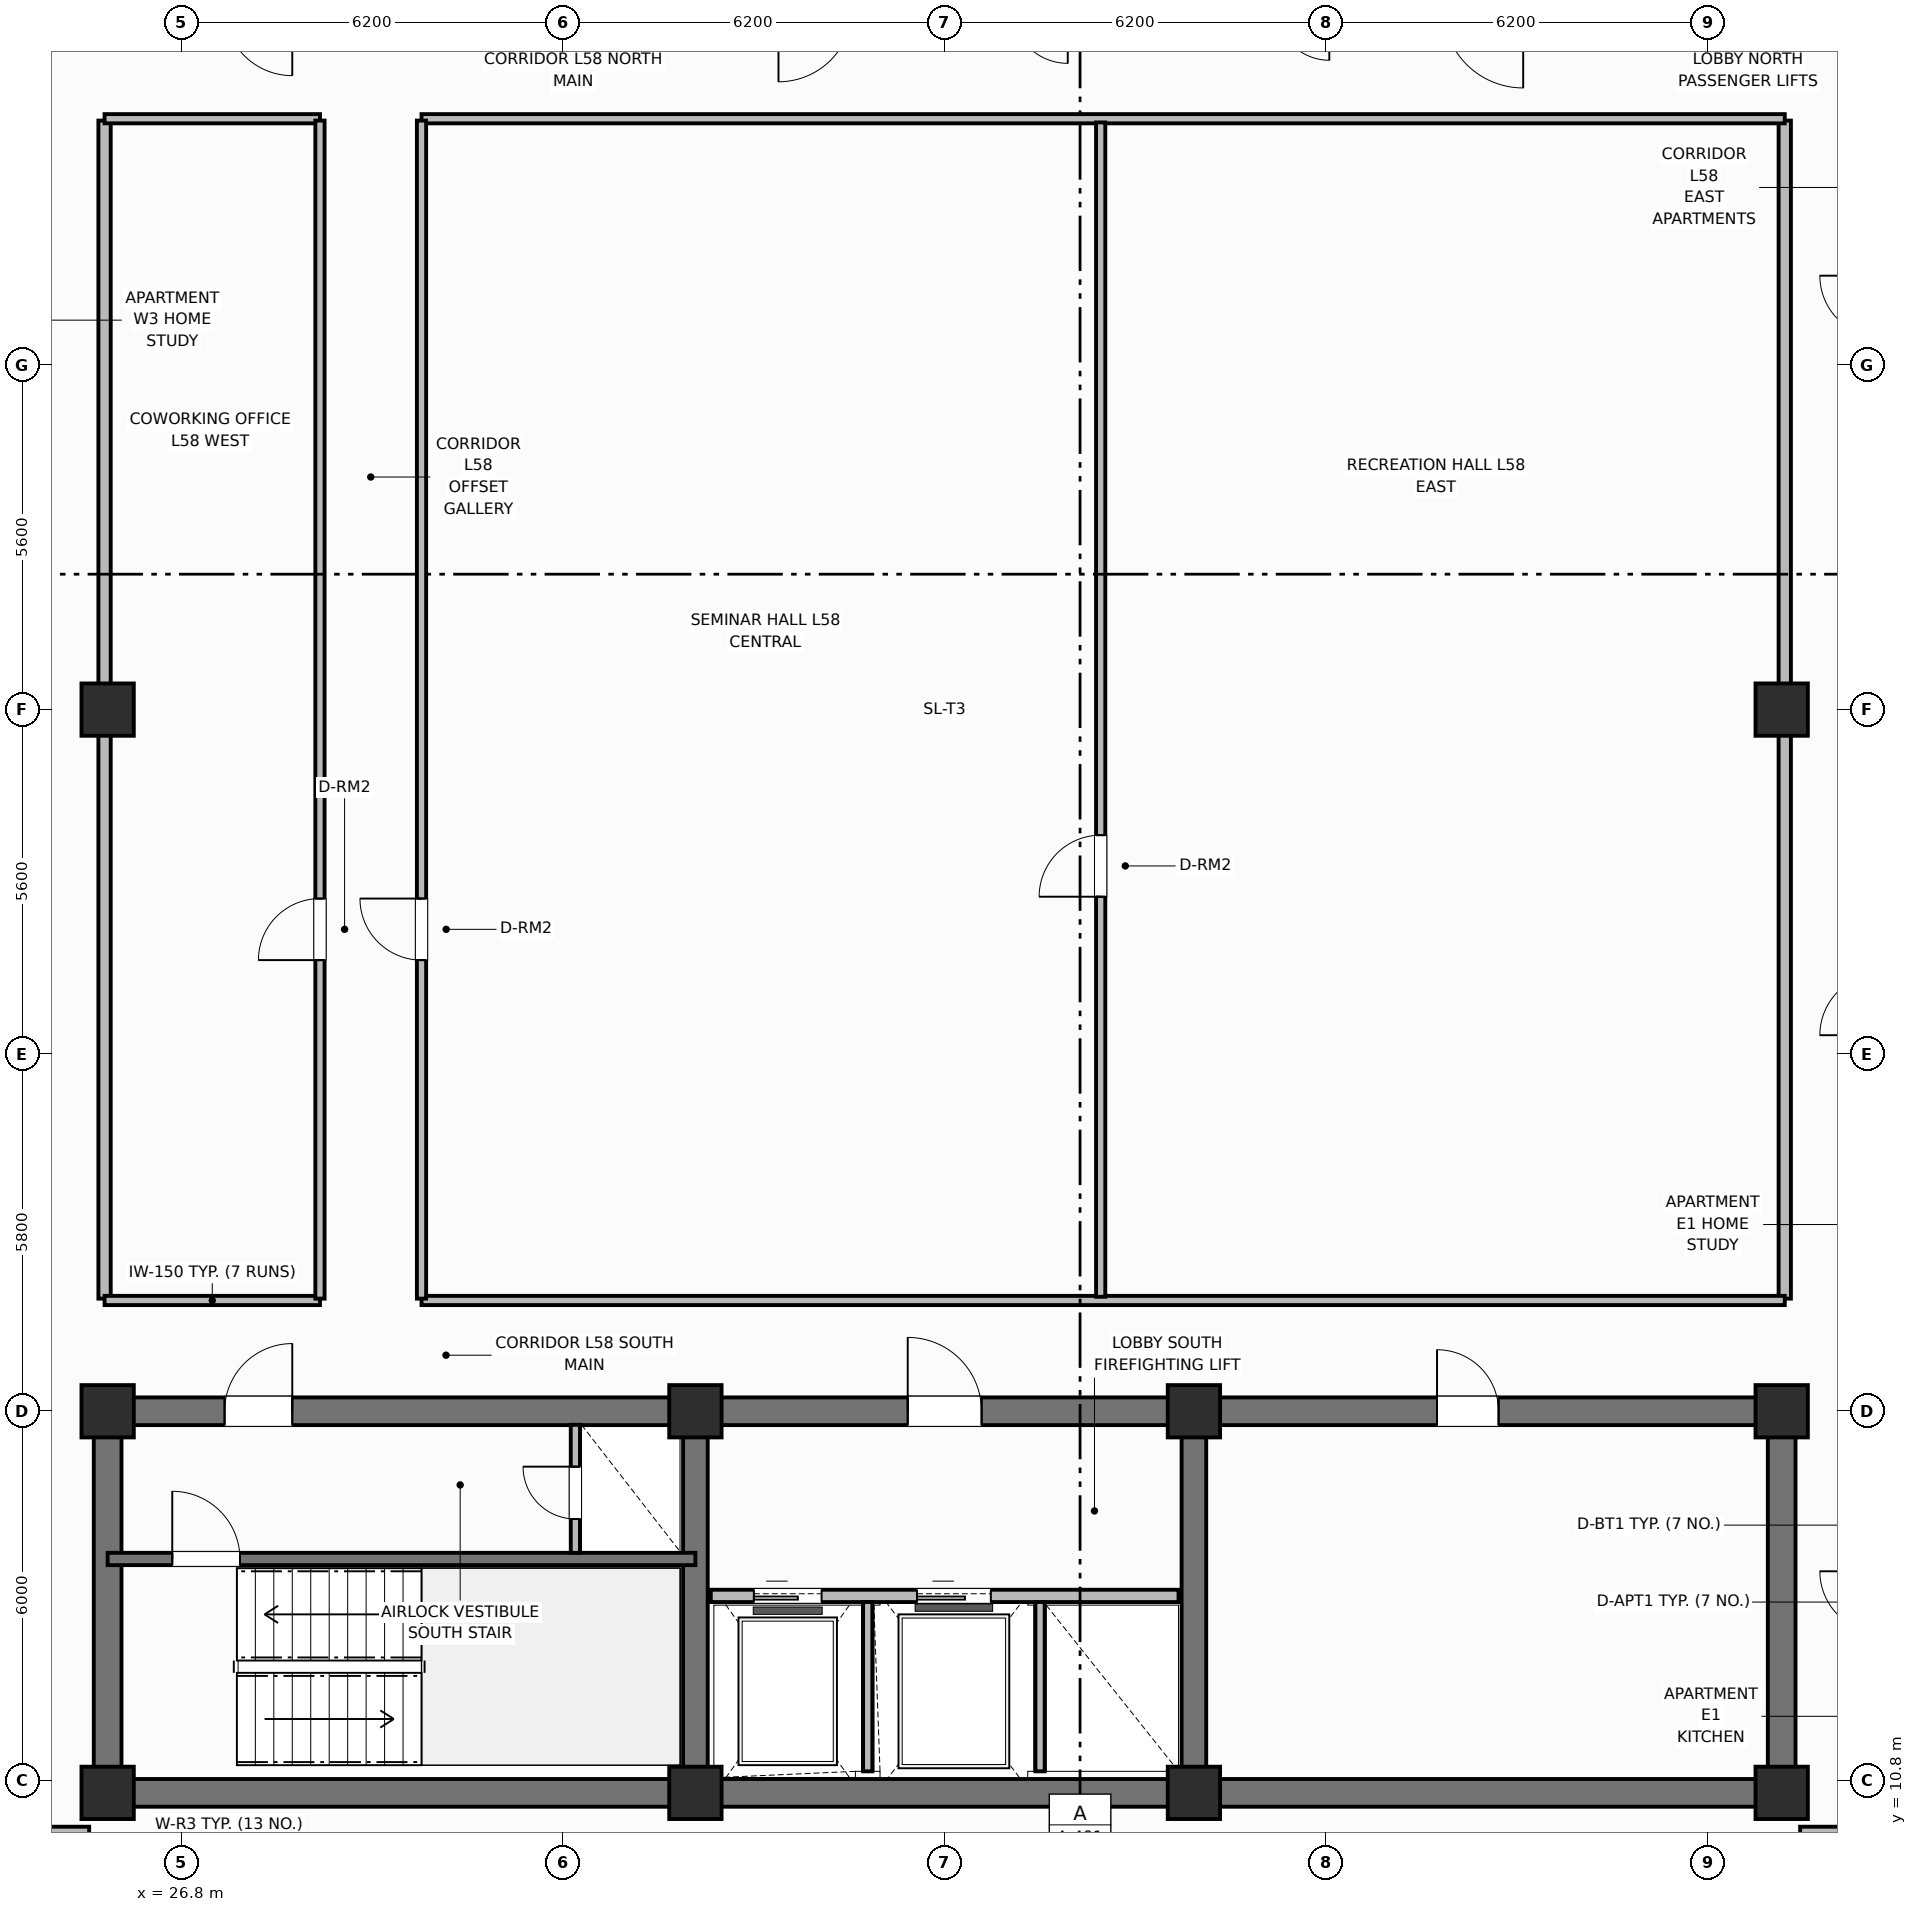
"""IFC4 building model, lengths in metres.
Left out: names, types, materials, properties, quantities, classifications, styles, units other than length and angle.
Written with IfcOpenShell. Run it as: python <this file> out.ifc"""

import sys

from ifc_helpers import new_model, si_unit, direction, frame, frame_2d, origin, origin_2d, place, context, subcontext, project, spatial, rectangle, extrude, element, fill, save


model = new_model("IFC4")
c1 = context("Model", 3, precision=1e-05, world=origin(), true_north=direction((0.0, 1.0)))
c2 = subcontext(c1, "Body", "Model", "MODEL_VIEW")
j1 = project(units=[si_unit("LENGTHUNIT", "METRE"), si_unit("PLANEANGLEUNIT", "RADIAN")], contexts=[c1])
p1 = place(None, origin())
s1 = spatial("IfcSite", under=j1, at=p1, CompositionType="ELEMENT")
p2 = place(p1, origin())
s2 = spatial("IfcBuilding", under=s1, at=p2, CompositionType="ELEMENT")
p3 = place(p2, frame((0.0, 0.0, 233.2)))
s3 = spatial("IfcBuildingStorey", under=s2, at=p3, CompositionType="ELEMENT", Elevation=233.2)
p4 = place(p3, frame((52.8, 10.6, 0.0), z_axis=(0.0, 0.0, 1.0), x_axis=(-1.0, 0.0, 0.0)))
e1 = element("IfcWall", 1, at=p4, inside=s3, PredefinedType="SHEAR", context=c2, shape_type="SweptSolid", body=[
    extrude(rectangle(XDim=27.2, YDim=0.45, at=frame_2d((13.6, 0.0))), origin(), (0.0, 0.0, 1.0), 3.7),
])
for number, where, z_axis, x_axis in (
    (2, (25.6, 10.825, 0.0), (0.0, 0.0, 1.0), (0.0, 1.0, 0.0)),
    (3, (52.8, 10.825, 0.0), (0.0, 0.0, 1.0), (0.0, 1.0, 0.0)),
):
    element("IfcWall", number, at=place(p3, frame(where, z_axis=z_axis, x_axis=x_axis)), inside=s3, PredefinedType="SHEAR", context=c2, shape_type="SweptSolid", body=[
        extrude(rectangle(XDim=5.75, YDim=0.45, at=frame_2d((2.875, 0.0))), origin(), (0.0, 0.0, 1.0), 3.7),
    ])
p5 = place(p3, frame((25.6, 16.8, 0.0), z_axis=(0.0, 0.0, 1.0), x_axis=(1.0, 0.0, 0.0)))
e4 = element("IfcWall", 4, at=p5, inside=s3, PredefinedType="SHEAR", context=c2, shape_type="SweptSolid", body=[
    extrude(rectangle(XDim=27.2, YDim=0.45, at=frame_2d((13.6, 0.0))), origin(), (0.0, 0.0, 1.0), 3.7),
])
p6 = place(p5, frame((1.9, 0.0, 0.0)))
e5 = element("IfcOpeningElement", 5, at=p6, cuts=e4, PredefinedType="OPENING", context=c2, shape_type="SweptSolid", body=[
    extrude(rectangle(XDim=1.1, YDim=2.15, at=frame_2d((0.55, 1.075))), frame((0.0, 0.235, 0.0), z_axis=(0.0, -1.0, 0.0), x_axis=(1.0, 0.0, 0.0)), (0.0, 0.0, 1.0), 0.47),
])
p7 = place(p5, frame((13.0, 0.0, 0.0)))
e6 = element("IfcOpeningElement", 6, at=p7, cuts=e4, PredefinedType="OPENING", context=c2, shape_type="SweptSolid", body=[
    extrude(rectangle(XDim=1.2, YDim=2.15, at=frame_2d((0.6, 1.075))), frame((0.0, 0.235, 0.0), z_axis=(0.0, -1.0, 0.0), x_axis=(1.0, 0.0, 0.0)), (0.0, 0.0, 1.0), 0.47),
])
p8 = place(p5, frame((21.6, 0.0, 0.0)))
e7 = element("IfcOpeningElement", 7, at=p8, cuts=e4, PredefinedType="OPENING", context=c2, shape_type="SweptSolid", body=[
    extrude(rectangle(XDim=1.0, YDim=2.15, at=frame_2d((0.5, 1.075))), frame((0.0, 0.235, 0.0), z_axis=(0.0, -1.0, 0.0), x_axis=(1.0, 0.0, 0.0)), (0.0, 0.0, 1.0), 0.47),
])
for number, where, z_axis, x_axis in (
    (8, (35.15, 10.825, 0.0), (0.0, 0.0, 1.0), (0.0, 1.0, 0.0)),
    (9, (43.25, 10.825, 0.0), (0.0, 0.0, 1.0), (0.0, 1.0, 0.0)),
):
    element("IfcWall", number, at=place(p3, frame(where, z_axis=z_axis, x_axis=x_axis)), inside=s3, PredefinedType="SHEAR", context=c2, shape_type="SweptSolid", body=[
        extrude(rectangle(XDim=5.75, YDim=0.4, at=frame_2d((2.875, 0.0))), origin(), (0.0, 0.0, 1.0), 3.7),
    ])
for number, where, z_axis, x_axis in (
    (10, (25.6, 10.6, 0.0), (0.0, 0.0, 1.0), (1.0, 0.0, 0.0)),
    (11, (25.6, 16.8, 0.0), (0.0, 0.0, 1.0), (1.0, 0.0, 0.0)),
    (12, (35.15, 10.6, 0.0), (0.0, 0.0, 1.0), (1.0, 0.0, 0.0)),
    (13, (35.15, 16.8, 0.0), (0.0, 0.0, 1.0), (1.0, 0.0, 0.0)),
    (14, (43.25, 10.6, 0.0), (0.0, 0.0, 1.0), (1.0, 0.0, 0.0)),
    (15, (43.25, 16.8, 0.0), (0.0, 0.0, 1.0), (1.0, 0.0, 0.0)),
    (16, (52.8, 10.6, 0.0), (0.0, 0.0, 1.0), (1.0, 0.0, 0.0)),
    (17, (52.8, 16.8, 0.0), (0.0, 0.0, 1.0), (1.0, 0.0, 0.0)),
    (18, (25.6, 28.2, 0.0), (0.0, 0.0, 1.0), (1.0, 0.0, 0.0)),
    (19, (52.8, 28.2, 0.0), (0.0, 0.0, 1.0), (1.0, 0.0, 0.0)),
):
    element("IfcColumn", number, at=place(p3, frame(where, z_axis=z_axis, x_axis=x_axis)), inside=s3, PredefinedType="COLUMN", context=c2, shape_type="SweptSolid", body=[
        extrude(rectangle(XDim=0.85, YDim=0.85, at=origin_2d()), origin(), (0.0, 0.0, 1.0), 3.7),
    ])
p9 = place(p3, frame((25.6, 14.4, 0.0), z_axis=(0.0, 0.0, 1.0), x_axis=(1.0, 0.0, 0.0)))
e20 = element("IfcWall", 20, at=p9, inside=s3, PredefinedType="SHEAR", context=c2, shape_type="SweptSolid", body=[
    extrude(rectangle(XDim=9.55, YDim=0.2, at=frame_2d((4.775, 0.0))), origin(), (0.0, 0.0, 1.0), 3.7),
])
p10 = place(p9, frame((1.05, 0.0, 0.0)))
e21 = element("IfcOpeningElement", 21, at=p10, cuts=e20, PredefinedType="OPENING", context=c2, shape_type="SweptSolid", body=[
    extrude(rectangle(XDim=1.1, YDim=2.15, at=frame_2d((0.55, 1.075))), frame((0.0, 0.11, 0.0), z_axis=(0.0, -1.0, 0.0), x_axis=(1.0, 0.0, 0.0)), (0.0, 0.0, 1.0), 0.22),
])
p11 = place(p3, frame((33.2, 14.5, 0.0), z_axis=(0.0, 0.0, 1.0), x_axis=(0.0, 1.0, 0.0)))
e22 = element("IfcWall", 22, at=p11, inside=s3, PredefinedType="PARTITIONING", context=c2, shape_type="SweptSolid", body=[
    extrude(rectangle(XDim=2.08, YDim=0.15, at=frame_2d((1.04, 0.0))), origin(), (0.0, 0.0, 1.0), 2.56),
])
p12 = place(p11, frame((0.55, 0.0, 0.0)))
e23 = element("IfcOpeningElement", 23, at=p12, cuts=e22, PredefinedType="OPENING", context=c2, shape_type="SweptSolid", body=[
    extrude(rectangle(XDim=0.85, YDim=2.05, at=frame_2d((0.425, 1.025))), frame((0.0, 0.085, 0.0), z_axis=(0.0, -1.0, 0.0), x_axis=(1.0, 0.0, 0.0)), (0.0, 0.0, 1.0), 0.17),
])
p13 = place(p3, frame((35.4, 13.8, 0.0), z_axis=(0.0, 0.0, 1.0), x_axis=(1.0, 0.0, 0.0)))
e24 = element("IfcWall", 24, at=p13, inside=s3, PredefinedType="PARTITIONING", context=c2, shape_type="SweptSolid", body=[
    extrude(rectangle(XDim=7.6, YDim=0.2, at=frame_2d((3.8, 0.0))), origin(), (0.0, 0.0, 1.0), 2.33),
])
p14 = place(p13, frame((0.7, 0.0, 0.0)))
e25 = element("IfcOpeningElement", 25, at=p14, cuts=e24, PredefinedType="OPENING", context=c2, shape_type="SweptSolid", body=[
    extrude(rectangle(XDim=1.1, YDim=2.15, at=frame_2d((0.55, 1.075))), frame((0.0, 0.11, 0.0), z_axis=(0.0, -1.0, 0.0), x_axis=(1.0, 0.0, 0.0)), (0.0, 0.0, 1.0), 0.22),
])
p15 = place(p13, frame((3.35, 0.0, 0.0)))
e26 = element("IfcOpeningElement", 26, at=p15, cuts=e24, PredefinedType="OPENING", context=c2, shape_type="SweptSolid", body=[
    extrude(rectangle(XDim=1.2, YDim=2.15, at=frame_2d((0.6, 1.075))), frame((0.0, 0.11, 0.0), z_axis=(0.0, -1.0, 0.0), x_axis=(1.0, 0.0, 0.0)), (0.0, 0.0, 1.0), 0.22),
])
for number, where, z_axis, x_axis in (
    (27, (37.95, 10.95, 0.0), (0.0, 0.0, 1.0), (0.0, 1.0, 0.0)),
    (28, (40.75, 10.95, 0.0), (0.0, 0.0, 1.0), (0.0, 1.0, 0.0)),
):
    element("IfcWall", number, at=place(p3, frame(where, z_axis=z_axis, x_axis=x_axis)), inside=s3, PredefinedType="PARTITIONING", context=c2, shape_type="SweptSolid", body=[
        extrude(rectangle(XDim=2.75, YDim=0.15, at=frame_2d((1.375, 0.0))), origin(), (0.0, 0.0, 1.0), 2.56),
    ])
for number, where, z_axis, x_axis in (
    (29, (25.55, 18.63, 0.0), (0.0, 0.0, 1.0), (0.0, 1.0, 0.0)),
    (30, (52.85, 18.63, 0.0), (0.0, 0.0, 1.0), (0.0, 1.0, 0.0)),
):
    element("IfcWall", number, at=place(p3, frame(where, z_axis=z_axis, x_axis=x_axis)), inside=s3, PredefinedType="PARTITIONING", context=c2, shape_type="SweptSolid", body=[
        extrude(rectangle(XDim=19.14, YDim=0.2, at=frame_2d((9.57, 0.0))), origin(), (0.0, 0.0, 1.0), 2.56),
    ])
p16 = place(p3, frame((25.55, 18.6, 0.0), z_axis=(0.0, 0.0, 1.0), x_axis=(1.0, 0.0, 0.0)))
e31 = element("IfcWall", 31, at=p16, inside=s3, PredefinedType="PARTITIONING", context=c2, shape_type="SweptSolid", body=[
    extrude(rectangle(XDim=3.5, YDim=0.15, at=frame_2d((1.75, 0.0))), origin(), (0.0, 0.0, 1.0), 2.56),
])
p17 = place(p3, frame((30.7, 18.6, 0.0), z_axis=(0.0, 0.0, 1.0), x_axis=(1.0, 0.0, 0.0)))
e32 = element("IfcWall", 32, at=p17, inside=s3, PredefinedType="PARTITIONING", context=c2, shape_type="SweptSolid", body=[
    extrude(rectangle(XDim=22.15, YDim=0.15, at=frame_2d((11.075, 0.0))), origin(), (0.0, 0.0, 1.0), 2.56),
])
p18 = place(p3, frame((25.55, 37.8, 0.0), z_axis=(0.0, 0.0, 1.0), x_axis=(1.0, 0.0, 0.0)))
e33 = element("IfcWall", 33, at=p18, inside=s3, PredefinedType="PARTITIONING", context=c2, shape_type="SweptSolid", body=[
    extrude(rectangle(XDim=3.5, YDim=0.15, at=frame_2d((1.75, 0.0))), origin(), (0.0, 0.0, 1.0), 2.56),
])
p19 = place(p3, frame((30.7, 37.8, 0.0), z_axis=(0.0, 0.0, 1.0), x_axis=(1.0, 0.0, 0.0)))
e34 = element("IfcWall", 34, at=p19, inside=s3, PredefinedType="PARTITIONING", context=c2, shape_type="SweptSolid", body=[
    extrude(rectangle(XDim=22.15, YDim=0.15, at=frame_2d((11.075, 0.0))), origin(), (0.0, 0.0, 1.0), 2.56),
])
p20 = place(p3, frame((41.735, 18.66, 0.0), z_axis=(0.0, 0.0, 1.0), x_axis=(0.0, 1.0, 0.0)))
e35 = element("IfcWall", 35, at=p20, inside=s3, PredefinedType="PARTITIONING", context=c2, shape_type="SweptSolid", body=[
    extrude(rectangle(XDim=19.08, YDim=0.15, at=frame_2d((9.54, 0.0))), origin(), (0.0, 0.0, 1.0), 2.56),
])
p21 = place(p20, frame((6.5, 0.0, 0.0)))
e36 = element("IfcOpeningElement", 36, at=p21, cuts=e35, PredefinedType="OPENING", context=c2, shape_type="SweptSolid", body=[
    extrude(rectangle(XDim=1.0, YDim=2.15, at=frame_2d((0.5, 1.075))), frame((0.0, 0.085, 0.0), z_axis=(0.0, -1.0, 0.0), x_axis=(1.0, 0.0, 0.0)), (0.0, 0.0, 1.0), 0.17),
])
p22 = place(p3, frame((29.05, 18.63, 0.0), z_axis=(0.0, 0.0, 1.0), x_axis=(0.0, 1.0, 0.0)))
e37 = element("IfcWall", 37, at=p22, inside=s3, PredefinedType="PARTITIONING", context=c2, shape_type="SweptSolid", body=[
    extrude(rectangle(XDim=19.14, YDim=0.15, at=frame_2d((9.57, 0.0))), origin(), (0.0, 0.0, 1.0), 2.56),
])
p23 = place(p22, frame((5.5, 0.0, 0.0)))
e38 = element("IfcOpeningElement", 38, at=p23, cuts=e37, PredefinedType="OPENING", context=c2, shape_type="SweptSolid", body=[
    extrude(rectangle(XDim=1.0, YDim=2.15, at=frame_2d((0.5, 1.075))), frame((0.0, 0.085, 0.0), z_axis=(0.0, -1.0, 0.0), x_axis=(1.0, 0.0, 0.0)), (0.0, 0.0, 1.0), 0.17),
])
p24 = place(p3, frame((30.7, 18.63, 0.0), z_axis=(0.0, 0.0, 1.0), x_axis=(0.0, 1.0, 0.0)))
e39 = element("IfcWall", 39, at=p24, inside=s3, PredefinedType="PARTITIONING", context=c2, shape_type="SweptSolid", body=[
    extrude(rectangle(XDim=19.14, YDim=0.15, at=frame_2d((9.57, 0.0))), origin(), (0.0, 0.0, 1.0), 2.56),
])
p25 = place(p24, frame((5.5, 0.0, 0.0)))
e40 = element("IfcOpeningElement", 40, at=p25, cuts=e39, PredefinedType="OPENING", context=c2, shape_type="SweptSolid", body=[
    extrude(rectangle(XDim=1.0, YDim=2.15, at=frame_2d((0.5, 1.075))), frame((0.0, 0.085, 0.0), z_axis=(0.0, -1.0, 0.0), x_axis=(1.0, 0.0, 0.0)), (0.0, 0.0, 1.0), 0.17),
])
p26 = place(p3, frame((21.546, 9.95, 0.0), z_axis=(0.0, 0.0, 1.0), x_axis=(1.0, 0.0, 0.0)))
e41 = element("IfcWall", 41, at=p26, inside=s3, PredefinedType="PARTITIONING", context=c2, shape_type="SweptSolid", body=[
    extrude(rectangle(XDim=3.754, YDim=0.2, at=frame_2d((1.877, 0.0))), origin(), (0.0, 0.0, 1.0), 2.56),
])
p27 = place(p3, frame((53.1, 9.95, 0.0), z_axis=(0.0, 0.0, 1.0), x_axis=(1.0, 0.0, 0.0)))
e42 = element("IfcWall", 42, at=p27, inside=s3, PredefinedType="PARTITIONING", context=c2, shape_type="SweptSolid", body=[
    extrude(rectangle(XDim=3.754, YDim=0.2, at=frame_2d((1.877, 0.0))), origin(), (0.0, 0.0, 1.0), 2.56),
])
p28 = place(p10, origin())
e43 = element("IfcDoor", 43, at=p28, inside=s3, OperationType="SINGLE_SWING_LEFT", PredefinedType="DOOR", context=c2, shape_type="SweptSolid", body=[
    extrude(rectangle(XDim=1.1, YDim=2.15, at=frame_2d((0.55, 1.075))), frame((0.0, 0.025, 0.0), z_axis=(0.0, -1.0, 0.0), x_axis=(1.0, 0.0, 0.0)), (0.0, 0.0, 1.0), 0.05),
])
fill(e21, e43)
p29 = place(p12, origin())
e44 = element("IfcDoor", 44, at=p29, inside=s3, OperationType="SINGLE_SWING_RIGHT", PredefinedType="TRAPDOOR", context=c2, shape_type="SweptSolid", body=[
    extrude(rectangle(XDim=0.85, YDim=2.05, at=frame_2d((0.425, 1.025))), frame((0.0, 0.025, 0.0), z_axis=(0.0, -1.0, 0.0), x_axis=(1.0, 0.0, 0.0)), (0.0, 0.0, 1.0), 0.05),
])
fill(e23, e44)
p30 = place(p14, origin())
e45 = element("IfcDoor", 45, at=p30, inside=s3, OperationType="SLIDING_TO_LEFT", PredefinedType="DOOR", context=c2, shape_type="SweptSolid", body=[
    extrude(rectangle(XDim=1.1, YDim=2.15, at=frame_2d((0.55, 1.075))), frame((0.0, 0.025, 0.0), z_axis=(0.0, -1.0, 0.0), x_axis=(1.0, 0.0, 0.0)), (0.0, 0.0, 1.0), 0.05),
])
fill(e25, e45)
p31 = place(p15, origin())
e46 = element("IfcDoor", 46, at=p31, inside=s3, OperationType="SLIDING_TO_LEFT", PredefinedType="DOOR", context=c2, shape_type="SweptSolid", body=[
    extrude(rectangle(XDim=1.2, YDim=2.15, at=frame_2d((0.6, 1.075))), frame((0.0, 0.025, 0.0), z_axis=(0.0, -1.0, 0.0), x_axis=(1.0, 0.0, 0.0)), (0.0, 0.0, 1.0), 0.05),
])
fill(e26, e46)
p32 = place(p21, origin())
e47 = element("IfcDoor", 47, at=p32, inside=s3, OperationType="SINGLE_SWING_LEFT", PredefinedType="DOOR", context=c2, shape_type="SweptSolid", body=[
    extrude(rectangle(XDim=1.0, YDim=2.15, at=frame_2d((0.5, 1.075))), frame((0.0, 0.025, 0.0), z_axis=(0.0, -1.0, 0.0), x_axis=(1.0, 0.0, 0.0)), (0.0, 0.0, 1.0), 0.05),
])
fill(e36, e47)
p33 = place(p23, origin())
e48 = element("IfcDoor", 48, at=p33, inside=s3, OperationType="SINGLE_SWING_LEFT", PredefinedType="DOOR", context=c2, shape_type="SweptSolid", body=[
    extrude(rectangle(XDim=1.0, YDim=2.15, at=frame_2d((0.5, 1.075))), frame((0.0, 0.025, 0.0), z_axis=(0.0, -1.0, 0.0), x_axis=(1.0, 0.0, 0.0)), (0.0, 0.0, 1.0), 0.05),
])
fill(e38, e48)
p34 = place(p25, origin())
e49 = element("IfcDoor", 49, at=p34, inside=s3, OperationType="SINGLE_SWING_RIGHT", PredefinedType="DOOR", context=c2, shape_type="SweptSolid", body=[
    extrude(rectangle(XDim=1.0, YDim=2.15, at=frame_2d((0.5, 1.075))), frame((0.0, 0.025, 0.0), z_axis=(0.0, -1.0, 0.0), x_axis=(1.0, 0.0, 0.0)), (0.0, 0.0, 1.0), 0.05),
])
fill(e40, e49)
p35 = place(p6, origin())
e50 = element("IfcDoor", 50, at=p35, inside=s3, OperationType="SINGLE_SWING_RIGHT", PredefinedType="DOOR", context=c2, shape_type="SweptSolid", body=[
    extrude(rectangle(XDim=1.1, YDim=2.15, at=frame_2d((0.55, 1.075))), frame((0.0, 0.025, 0.0), z_axis=(0.0, -1.0, 0.0), x_axis=(1.0, 0.0, 0.0)), (0.0, 0.0, 1.0), 0.05),
])
fill(e5, e50)
p36 = place(p7, origin())
e51 = element("IfcDoor", 51, at=p36, inside=s3, OperationType="SINGLE_SWING_LEFT", PredefinedType="DOOR", context=c2, shape_type="SweptSolid", body=[
    extrude(rectangle(XDim=1.2, YDim=2.15, at=frame_2d((0.6, 1.075))), frame((0.0, 0.025, 0.0), z_axis=(0.0, -1.0, 0.0), x_axis=(1.0, 0.0, 0.0)), (0.0, 0.0, 1.0), 0.05),
])
fill(e6, e51)
p37 = place(p8, origin())
e52 = element("IfcDoor", 52, at=p37, inside=s3, OperationType="SINGLE_SWING_LEFT", PredefinedType="DOOR", context=c2, shape_type="SweptSolid", body=[
    extrude(rectangle(XDim=1.0, YDim=2.15, at=frame_2d((0.5, 1.075))), frame((0.0, 0.025, 0.0), z_axis=(0.0, -1.0, 0.0), x_axis=(1.0, 0.0, 0.0)), (0.0, 0.0, 1.0), 0.05),
])
fill(e7, e52)
save(model, sys.argv[1])
